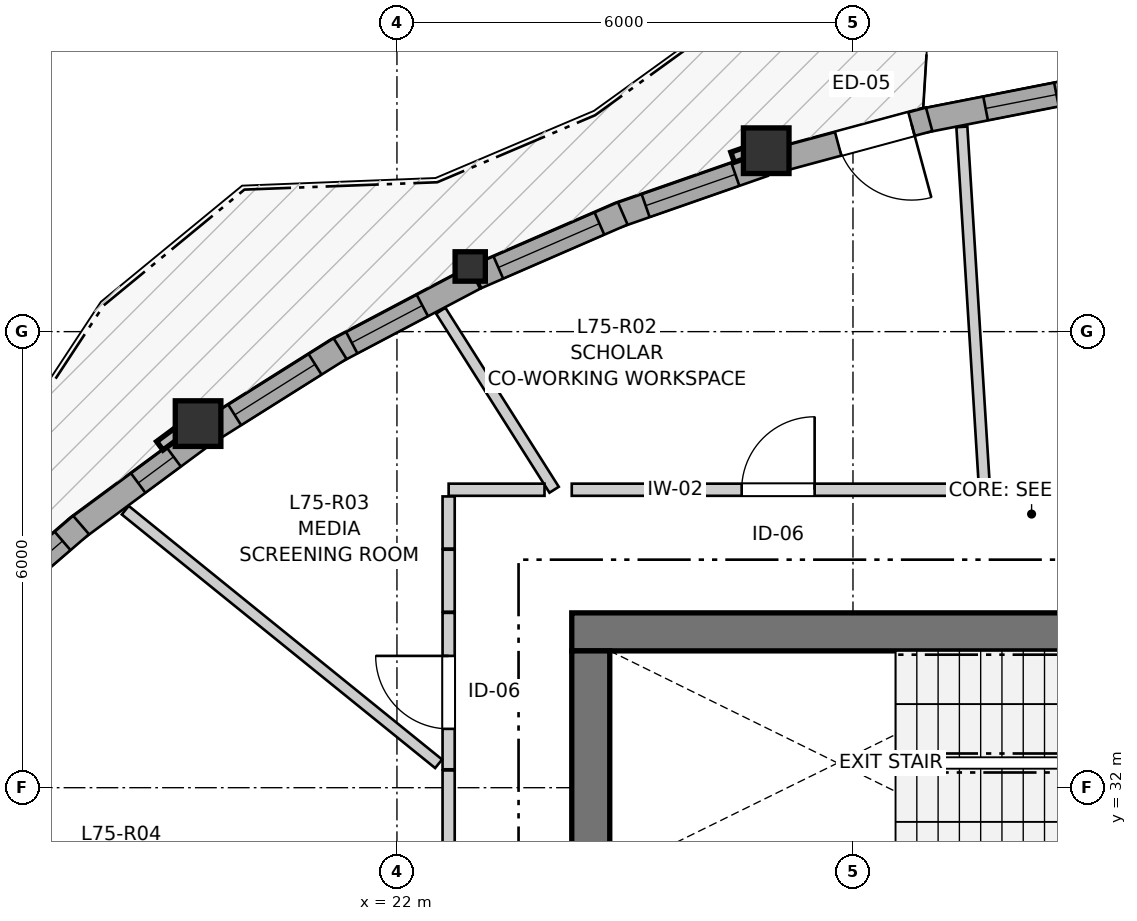
"""IFC4 building model, lengths in metres.
Left out: names, types, materials, properties, quantities, classifications, styles, units other than length and angle.
Written with IfcOpenShell. Run it as: python <this file> out.ifc"""

import sys

from ifc_helpers import new_model, si_unit, direction, frame, frame_2d, origin, origin_2d, place, context, subcontext, project, spatial, rectangle, i_section, extrude, source, transform, mapped, element, fill, save


model = new_model("IFC4")
c1 = context("Model", 3, precision=1e-05, world=origin(), true_north=direction((0.0, 1.0)))
c2 = subcontext(c1, "Body", "Model", "MODEL_VIEW")
j1 = project(units=[si_unit("LENGTHUNIT", "METRE"), si_unit("PLANEANGLEUNIT", "RADIAN")], contexts=[c1])
p1 = place(None, origin())
s1 = spatial("IfcSite", under=j1, at=p1, CompositionType="ELEMENT")
p2 = place(p1, origin())
s2 = spatial("IfcBuilding", under=s1, at=p2, CompositionType="ELEMENT")
p3 = place(p2, frame((0.0, 0.0, 250.0)))
s3 = spatial("IfcBuildingStorey", under=s2, at=p3, CompositionType="ELEMENT", Elevation=250.0)
p4 = place(p3, frame((36.4, 34.05, 0.0), z_axis=(0.0, 0.0, 1.0), x_axis=(-1.0, 0.0, 0.0)))
e1 = element("IfcWall", 1, at=p4, inside=s3, PredefinedType="SHEAR", context=c2, shape_type="SweptSolid", body=[
    extrude(rectangle(XDim=12.1, YDim=0.5, at=frame_2d((6.05, 0.0))), origin(), (0.0, 0.0, 1.0), 2.95),
])
p5 = place(p3, frame((24.55, 33.8, 0.0), z_axis=(0.0, 0.0, 1.0), x_axis=(0.0, -1.0, 0.0)))
e2 = element("IfcWall", 2, at=p5, inside=s3, PredefinedType="SHEAR", context=c2, shape_type="SweptSolid", body=[
    extrude(rectangle(XDim=15.6, YDim=0.5, at=frame_2d((7.8, 0.0))), origin(), (0.0, 0.0, 1.0), 2.95),
])
p6 = place(p5, frame((7.05, 0.0, 0.0)))
e3 = element("IfcOpeningElement", 3, at=p6, cuts=e2, PredefinedType="OPENING", context=c2, shape_type="SweptSolid", body=[
    extrude(rectangle(XDim=1.5, YDim=2.15, at=frame_2d((0.75, 1.075))), frame((0.0, 0.26, 0.0), z_axis=(0.0, -1.0, 0.0), x_axis=(1.0, 0.0, 0.0)), (0.0, 0.0, 1.0), 0.52),
])
p7 = place(p5, frame((3.52, 0.0, 0.0)))
e4 = element("IfcOpeningElement", 4, at=p7, cuts=e2, PredefinedType="OPENING", context=c2, shape_type="SweptSolid", body=[
    extrude(rectangle(XDim=0.86, YDim=2.05, at=frame_2d((0.43, 1.025))), frame((0.0, 0.26, 0.0), z_axis=(0.0, -1.0, 0.0), x_axis=(1.0, 0.0, 0.0)), (0.0, 0.0, 1.0), 0.52),
])
p8 = place(p5, frame((11.22, 0.0, 0.0)))
e5 = element("IfcOpeningElement", 5, at=p8, cuts=e2, PredefinedType="OPENING", context=c2, shape_type="SweptSolid", body=[
    extrude(rectangle(XDim=0.86, YDim=2.05, at=frame_2d((0.43, 1.025))), frame((0.0, 0.26, 0.0), z_axis=(0.0, -1.0, 0.0), x_axis=(1.0, 0.0, 0.0)), (0.0, 0.0, 1.0), 0.52),
])
m1 = source(origin(), c2, "Body", "SweptSolid", [
    extrude(rectangle(XDim=0.6, YDim=0.6, at=origin_2d()), origin(), (0.0, 0.0, 1.0), 2.95),
])
p9 = place(p3, frame((26.859, 40.38, 0.0), z_axis=(0.0, 0.0, 1.0), x_axis=(1.0, 0.0, 0.0)))
e6 = element("IfcColumn", 6, at=p9, inside=s3, PredefinedType="COLUMN", context=c2, shape_type="MappedRepresentation", body=[
    mapped(m1, transform((0.0, 0.0, 0.0), x_axis=(1.0, 0.0, 0.0), y_axis=(0.0, 1.0, 0.0), z_axis=(0.0, 0.0, 1.0), scale=1.0)),
])
m2 = source(origin(), c2, "Body", "SweptSolid", [
    extrude(i_section(OverallWidth=0.398, OverallDepth=0.387, WebThickness=0.019, FlangeThickness=0.03, FilletRadius=0.015, at=origin_2d()), origin(), (0.0, 0.0, 1.0), 2.95),
])
p10 = place(p3, frame((22.964, 38.857, 0.0), z_axis=(0.0, 0.0, 1.0), x_axis=(1.0, 0.0, 0.0)))
e7 = element("IfcColumn", 7, at=p10, inside=s3, PredefinedType="PILASTER", context=c2, shape_type="MappedRepresentation", body=[
    mapped(m2, transform((0.0, 0.0, 0.0), x_axis=(1.0, 0.0, 0.0), y_axis=(0.0, 1.0, 0.0), z_axis=(0.0, 0.0, 1.0), scale=1.0)),
])
p11 = place(p3, frame((19.383, 36.79, 0.0), z_axis=(0.0, 0.0, 1.0), x_axis=(1.0, 0.0, 0.0)))
e8 = element("IfcColumn", 8, at=p11, inside=s3, PredefinedType="COLUMN", context=c2, shape_type="MappedRepresentation", body=[
    mapped(m1, transform((0.0, 0.0, 0.0), x_axis=(1.0, 0.0, 0.0), y_axis=(0.0, 1.0, 0.0), z_axis=(0.0, 0.0, 1.0), scale=1.0)),
])
p12 = place(p3, frame((31.079, 41.198, 0.0), z_axis=(0.0, 0.0, 1.0), x_axis=(-0.981223354781, -0.192874902544, 0.0)))
e9 = element("IfcWall", 9, at=p12, inside=s3, PredefinedType="SOLIDWALL", context=c2, shape_type="SweptSolid", body=[
    extrude(rectangle(XDim=2.202, YDim=0.32, at=frame_2d((1.101, 0.0))), origin(), (0.0, 0.0, 1.0), 2.57),
])
p13 = place(p12, frame((0.409, 0.0, 0.82)))
e10 = element("IfcOpeningElement", 10, at=p13, cuts=e9, PredefinedType="OPENING", context=c2, shape_type="SweptSolid", body=[
    extrude(rectangle(XDim=0.95, YDim=1.35, at=frame_2d((0.475, 0.675))), frame((0.0, 0.17, 0.0), z_axis=(0.0, -1.0, 0.0), x_axis=(1.0, 0.0, 0.0)), (0.0, 0.0, 1.0), 0.34),
])
p14 = place(p3, frame((29.002, 40.793, 0.0), z_axis=(0.0, 0.0, 1.0), x_axis=(-0.965467637734, -0.260523013357, 0.0)))
e11 = element("IfcWall", 11, at=p14, inside=s3, PredefinedType="SOLIDWALL", context=c2, shape_type="SweptSolid", body=[
    extrude(rectangle(XDim=2.087, YDim=0.32, at=frame_2d((1.043, 0.0))), origin(), (0.0, 0.0, 1.0), 2.57),
])
p15 = place(p14, frame((0.24, 0.0, 0.0)))
e12 = element("IfcOpeningElement", 12, at=p15, cuts=e11, PredefinedType="OPENING", context=c2, shape_type="SweptSolid", body=[
    extrude(rectangle(XDim=1.0, YDim=2.1, at=frame_2d((0.5, 1.05))), frame((0.0, 0.17, 0.0), z_axis=(0.0, -1.0, 0.0), x_axis=(1.0, 0.0, 0.0)), (0.0, 0.0, 1.0), 0.34),
])
p16 = place(p3, frame((26.826, 40.199, 0.0), z_axis=(0.0, 0.0, 1.0), x_axis=(-0.944152853185, -0.329507799335, 0.0)))
e13 = element("IfcWall", 13, at=p16, inside=s3, PredefinedType="SOLIDWALL", context=c2, shape_type="SweptSolid", body=[
    extrude(rectangle(XDim=2.052, YDim=0.32, at=frame_2d((1.026, 0.0))), origin(), (0.0, 0.0, 1.0), 2.57),
])
p17 = place(p16, frame((0.396, 0.0, 0.82)))
e14 = element("IfcOpeningElement", 14, at=p17, cuts=e13, PredefinedType="OPENING", context=c2, shape_type="SweptSolid", body=[
    extrude(rectangle(XDim=1.25, YDim=1.35, at=frame_2d((0.625, 0.675))), frame((0.0, 0.17, 0.0), z_axis=(0.0, -1.0, 0.0), x_axis=(1.0, 0.0, 0.0)), (0.0, 0.0, 1.0), 0.34),
])
p18 = place(p3, frame((24.97, 39.555, 0.0), z_axis=(0.0, 0.0, 1.0), x_axis=(-0.917086701486, -0.398687825193, 0.0)))
e15 = element("IfcWall", 15, at=p18, inside=s3, PredefinedType="SOLIDWALL", context=c2, shape_type="SweptSolid", body=[
    extrude(rectangle(XDim=2.099, YDim=0.32, at=frame_2d((1.049, 0.0))), origin(), (0.0, 0.0, 1.0), 2.57),
])
p19 = place(p18, frame((0.334, 0.0, 0.82)))
e16 = element("IfcOpeningElement", 16, at=p19, cuts=e15, PredefinedType="OPENING", context=c2, shape_type="SweptSolid", body=[
    extrude(rectangle(XDim=1.45, YDim=1.25, at=frame_2d((0.725, 0.625))), frame((0.0, 0.17, 0.0), z_axis=(0.0, -1.0, 0.0), x_axis=(1.0, 0.0, 0.0)), (0.0, 0.0, 1.0), 0.34),
])
p20 = place(p3, frame((23.021, 38.707, 0.0), z_axis=(0.0, 0.0, 1.0), x_axis=(-0.884384752847, -0.466758619558, 0.0)))
e17 = element("IfcWall", 17, at=p20, inside=s3, PredefinedType="SOLIDWALL", context=c2, shape_type="SweptSolid", body=[
    extrude(rectangle(XDim=2.087, YDim=0.32, at=frame_2d((1.043, 0.0))), origin(), (0.0, 0.0, 1.0), 2.57),
])
p21 = place(p20, frame((0.777, 0.0, 0.82)))
e18 = element("IfcOpeningElement", 18, at=p21, cuts=e17, PredefinedType="OPENING", context=c2, shape_type="SweptSolid", body=[
    extrude(rectangle(XDim=1.05, YDim=1.45, at=frame_2d((0.525, 0.725))), frame((0.0, 0.17, 0.0), z_axis=(0.0, -1.0, 0.0), x_axis=(1.0, 0.0, 0.0)), (0.0, 0.0, 1.0), 0.34),
])
p22 = place(p3, frame((21.252, 37.777, 0.0), z_axis=(0.0, 0.0, 1.0), x_axis=(-0.846382416581, -0.532575633034, 0.0)))
e19 = element("IfcWall", 19, at=p22, inside=s3, PredefinedType="SOLIDWALL", context=c2, shape_type="SweptSolid", body=[
    extrude(rectangle(XDim=2.017, YDim=0.32, at=frame_2d((1.008, 0.0))), origin(), (0.0, 0.0, 1.0), 2.57),
])
p23 = place(p22, frame((0.388, 0.0, 0.82)))
e20 = element("IfcOpeningElement", 20, at=p23, cuts=e19, PredefinedType="OPENING", context=c2, shape_type="SweptSolid", body=[
    extrude(rectangle(XDim=1.25, YDim=1.35, at=frame_2d((0.625, 0.675))), frame((0.0, 0.17, 0.0), z_axis=(0.0, -1.0, 0.0), x_axis=(1.0, 0.0, 0.0)), (0.0, 0.0, 1.0), 0.34),
])
p24 = place(p3, frame((19.406, 36.608, 0.0), z_axis=(0.0, 0.0, 1.0), x_axis=(-0.803853407146, -0.594827453821, 0.0)))
e21 = element("IfcWall", 21, at=p24, inside=s3, PredefinedType="SOLIDWALL", context=c2, shape_type="SweptSolid", body=[
    extrude(rectangle(XDim=2.029, YDim=0.32, at=frame_2d((1.014, 0.0))), origin(), (0.0, 0.0, 1.0), 2.57),
])
p25 = place(p24, frame((0.428, 0.0, 0.82)))
e22 = element("IfcOpeningElement", 22, at=p25, cuts=e21, PredefinedType="OPENING", context=c2, shape_type="SweptSolid", body=[
    extrude(rectangle(XDim=0.58, YDim=1.35, at=frame_2d((0.29, 0.675))), frame((0.0, 0.17, 0.0), z_axis=(0.0, -1.0, 0.0), x_axis=(1.0, 0.0, 0.0)), (0.0, 0.0, 1.0), 0.34),
])
p26 = place(p3, frame((17.844, 35.456, 0.0), z_axis=(0.0, 0.0, 1.0), x_axis=(-0.757409961601, -0.652939622069, 0.0)))
e23 = element("IfcWall", 23, at=p26, inside=s3, PredefinedType="SOLIDWALL", context=c2, shape_type="SweptSolid", body=[
    extrude(rectangle(XDim=2.122, YDim=0.32, at=frame_2d((1.061, 0.0))), origin(), (0.0, 0.0, 1.0), 2.57),
])
p27 = place(p26, frame((0.321, 0.0, 0.82)))
e24 = element("IfcOpeningElement", 24, at=p27, cuts=e23, PredefinedType="OPENING", context=c2, shape_type="SweptSolid", body=[
    extrude(rectangle(XDim=1.5, YDim=1.45, at=frame_2d((0.75, 0.725))), frame((0.0, 0.17, 0.0), z_axis=(0.0, -1.0, 0.0), x_axis=(1.0, 0.0, 0.0)), (0.0, 0.0, 1.0), 0.34),
])
p28 = place(p3, frame((24.3, 35.92, 0.0), z_axis=(0.0, 0.0, 1.0), x_axis=(1.0, 0.0, 0.0)))
e25 = element("IfcWall", 25, at=p28, inside=s3, PredefinedType="PARTITIONING", context=c2, shape_type="SweptSolid", body=[
    extrude(rectangle(XDim=5.446, YDim=0.16, at=frame_2d((2.723, 0.0))), origin(), (0.0, 0.0, 1.0), 2.95),
])
p29 = place(p28, frame((2.236, 0.0, 0.0)))
e26 = element("IfcOpeningElement", 26, at=p29, cuts=e25, PredefinedType="OPENING", context=c2, shape_type="SweptSolid", body=[
    extrude(rectangle(XDim=0.96, YDim=2.1, at=frame_2d((0.48, 1.05))), frame((0.0, 0.09, 0.0), z_axis=(0.0, -1.0, 0.0), x_axis=(1.0, 0.0, 0.0)), (0.0, 0.0, 1.0), 0.18),
])
p30 = place(p3, frame((22.68, 27.85, 0.0), z_axis=(0.0, 0.0, 1.0), x_axis=(0.0, 1.0, 0.0)))
e27 = element("IfcWall", 27, at=p30, inside=s3, PredefinedType="PARTITIONING", context=c2, shape_type="SweptSolid", body=[
    extrude(rectangle(XDim=4.377, YDim=0.16, at=frame_2d((2.188, 0.0))), origin(), (0.0, 0.0, 1.0), 2.218),
])
p31 = place(p30, frame((1.559, 0.0, 0.0)))
e28 = element("IfcOpeningElement", 28, at=p31, cuts=e27, PredefinedType="OPENING", context=c2, shape_type="SweptSolid", body=[
    extrude(rectangle(XDim=1.3, YDim=2.1, at=frame_2d((0.65, 1.05))), frame((0.0, 0.09, 0.0), z_axis=(0.0, -1.0, 0.0), x_axis=(1.0, 0.0, 0.0)), (0.0, 0.0, 1.0), 0.18),
])
p32 = place(p3, frame((29.761, 35.92, 0.0), z_axis=(0.0, 0.0, 1.0), x_axis=(1.0, 0.0, 0.0)))
e29 = element("IfcWall", 29, at=p32, inside=s3, PredefinedType="PARTITIONING", context=c2, shape_type="SweptSolid", body=[
    extrude(rectangle(XDim=3.61, YDim=0.16, at=frame_2d((1.805, 0.0))), origin(), (0.0, 0.0, 1.0), 2.95),
])
p33 = place(p32, frame((1.133, 0.0, 0.0)))
e30 = element("IfcOpeningElement", 30, at=p33, cuts=e29, PredefinedType="OPENING", context=c2, shape_type="SweptSolid", body=[
    extrude(rectangle(XDim=1.3, YDim=2.1, at=frame_2d((0.65, 1.05))), frame((0.0, 0.09, 0.0), z_axis=(0.0, -1.0, 0.0), x_axis=(1.0, 0.0, 0.0)), (0.0, 0.0, 1.0), 0.18),
])
p34 = place(p3, frame((22.68, 32.242, 0.0), z_axis=(0.0, 0.0, 1.0), x_axis=(0.0, 1.0, 0.0)))
e31 = element("IfcWall", 31, at=p34, inside=s3, PredefinedType="PARTITIONING", context=c2, shape_type="SweptSolid", body=[
    extrude(rectangle(XDim=2.058, YDim=0.16, at=frame_2d((1.029, 0.0))), origin(), (0.0, 0.0, 1.0), 2.618),
])
p35 = place(p34, frame((0.532, 0.0, 0.0)))
e32 = element("IfcOpeningElement", 32, at=p35, cuts=e31, PredefinedType="OPENING", context=c2, shape_type="SweptSolid", body=[
    extrude(rectangle(XDim=0.96, YDim=2.1, at=frame_2d((0.48, 1.05))), frame((0.0, 0.09, 0.0), z_axis=(0.0, -1.0, 0.0), x_axis=(1.0, 0.0, 0.0)), (0.0, 0.0, 1.0), 0.18),
])
p36 = place(p3, frame((18.426, 35.651, 0.0), z_axis=(0.0, 0.0, 1.0), x_axis=(0.777348848989, -0.629069763202, 0.0)))
e33 = element("IfcWall", 33, at=p36, inside=s3, PredefinedType="PARTITIONING", context=c2, shape_type="SweptSolid", body=[
    extrude(rectangle(XDim=5.303, YDim=0.145, at=frame_2d((2.652, 0.0))), origin(), (0.0, 0.0, 1.0), 2.95),
])
p37 = place(p3, frame((29.433, 40.694, 0.0), z_axis=(0.0, 0.0, 1.0), x_axis=(0.062358842424, -0.998053793526, 0.0)))
e34 = element("IfcWall", 34, at=p37, inside=s3, PredefinedType="PARTITIONING", context=c2, shape_type="SweptSolid", body=[
    extrude(rectangle(XDim=4.69, YDim=0.145, at=frame_2d((2.345, 0.0))), origin(), (0.0, 0.0, 1.0), 2.95),
])
p38 = place(p3, frame((22.576, 38.275, 0.0), z_axis=(0.0, 0.0, 1.0), x_axis=(0.535027081988, -0.84483490786, 0.0)))
e35 = element("IfcWall", 35, at=p38, inside=s3, PredefinedType="PARTITIONING", context=c2, shape_type="SweptSolid", body=[
    extrude(rectangle(XDim=2.788, YDim=0.145, at=frame_2d((1.394, 0.0))), origin(), (0.0, 0.0, 1.0), 2.95),
])
p39 = place(p3, frame((22.68, 35.92, 0.0), z_axis=(0.0, 0.0, 1.0), x_axis=(1.0, 0.0, 0.0)))
e36 = element("IfcWall", 36, at=p39, inside=s3, PredefinedType="PARTITIONING", context=c2, shape_type="SweptSolid", body=[
    extrude(rectangle(XDim=1.261, YDim=0.16, at=frame_2d((0.631, 0.0))), origin(), (0.0, 0.0, 1.0), 2.95),
])
p40 = place(p3, frame((22.68, 34.315, 0.0), z_axis=(0.0, 0.0, 1.0), x_axis=(0.0, 1.0, 0.0)))
e37 = element("IfcWall", 37, at=p40, inside=s3, PredefinedType="PARTITIONING", context=c2, shape_type="SweptSolid", body=[
    extrude(rectangle(XDim=0.816, YDim=0.16, at=frame_2d((0.408, 0.0))), origin(), (0.0, 0.0, 1.0), 2.95),
])
p41 = place(p3, frame((22.68, 35.146, 0.0), z_axis=(0.0, 0.0, 1.0), x_axis=(0.0, 1.0, 0.0)))
e38 = element("IfcWall", 38, at=p41, inside=s3, PredefinedType="PARTITIONING", context=c2, shape_type="SweptSolid", body=[
    extrude(rectangle(XDim=0.686, YDim=0.16, at=frame_2d((0.343, 0.0))), origin(), (0.0, 0.0, 1.0), 2.95),
])
m3 = source(origin(), c2, "Body", "SweptSolid", [
    extrude(rectangle(XDim=0.95, YDim=1.35, at=frame_2d((0.475, 0.675))), frame((0.0, 0.03, 0.0), z_axis=(0.0, -1.0, 0.0), x_axis=(1.0, 0.0, 0.0)), (0.0, 0.0, 1.0), 0.06),
])
p42 = place(p13, origin())
e39 = element("IfcWindow", 39, at=p42, inside=s3, PartitioningType="SINGLE_PANEL", PredefinedType="WINDOW", context=c2, shape_type="MappedRepresentation", body=[
    mapped(m3, transform((0.0, 0.0, 0.0), x_axis=(1.0, 0.0, 0.0), y_axis=(0.0, 1.0, 0.0), z_axis=(0.0, 0.0, 1.0), scale=1.0)),
])
fill(e10, e39)
m4 = source(origin(), c2, "Body", "SweptSolid", [
    extrude(rectangle(XDim=1.25, YDim=1.35, at=frame_2d((0.625, 0.675))), frame((0.0, 0.03, 0.0), z_axis=(0.0, -1.0, 0.0), x_axis=(1.0, 0.0, 0.0)), (0.0, 0.0, 1.0), 0.06),
])
p43 = place(p17, origin())
e40 = element("IfcWindow", 40, at=p43, inside=s3, PartitioningType="SINGLE_PANEL", PredefinedType="WINDOW", context=c2, shape_type="MappedRepresentation", body=[
    mapped(m4, transform((0.0, 0.0, 0.0), x_axis=(1.0, 0.0, 0.0), y_axis=(0.0, 1.0, 0.0), z_axis=(0.0, 0.0, 1.0), scale=1.0)),
])
fill(e14, e40)
m5 = source(origin(), c2, "Body", "SweptSolid", [
    extrude(rectangle(XDim=1.45, YDim=1.25, at=frame_2d((0.725, 0.625))), frame((0.0, 0.03, 0.0), z_axis=(0.0, -1.0, 0.0), x_axis=(1.0, 0.0, 0.0)), (0.0, 0.0, 1.0), 0.06),
])
p44 = place(p19, origin())
e41 = element("IfcWindow", 41, at=p44, inside=s3, PartitioningType="SINGLE_PANEL", PredefinedType="WINDOW", context=c2, shape_type="MappedRepresentation", body=[
    mapped(m5, transform((0.0, 0.0, 0.0), x_axis=(1.0, 0.0, 0.0), y_axis=(0.0, 1.0, 0.0), z_axis=(0.0, 0.0, 1.0), scale=1.0)),
])
fill(e16, e41)
m6 = source(origin(), c2, "Body", "SweptSolid", [
    extrude(rectangle(XDim=1.05, YDim=1.45, at=frame_2d((0.525, 0.725))), frame((0.0, 0.03, 0.0), z_axis=(0.0, -1.0, 0.0), x_axis=(1.0, 0.0, 0.0)), (0.0, 0.0, 1.0), 0.06),
])
p45 = place(p21, origin())
e42 = element("IfcWindow", 42, at=p45, inside=s3, PartitioningType="SINGLE_PANEL", PredefinedType="WINDOW", context=c2, shape_type="MappedRepresentation", body=[
    mapped(m6, transform((0.0, 0.0, 0.0), x_axis=(1.0, 0.0, 0.0), y_axis=(0.0, 1.0, 0.0), z_axis=(0.0, 0.0, 1.0), scale=1.0)),
])
fill(e18, e42)
p46 = place(p23, origin())
e43 = element("IfcWindow", 43, at=p46, inside=s3, PartitioningType="SINGLE_PANEL", PredefinedType="WINDOW", context=c2, shape_type="MappedRepresentation", body=[
    mapped(m4, transform((0.0, 0.0, 0.0), x_axis=(1.0, 0.0, 0.0), y_axis=(0.0, 1.0, 0.0), z_axis=(0.0, 0.0, 1.0), scale=1.0)),
])
fill(e20, e43)
m7 = source(origin(), c2, "Body", "SweptSolid", [
    extrude(rectangle(XDim=0.58, YDim=1.35, at=frame_2d((0.29, 0.675))), frame((0.0, 0.03, 0.0), z_axis=(0.0, -1.0, 0.0), x_axis=(1.0, 0.0, 0.0)), (0.0, 0.0, 1.0), 0.06),
])
p47 = place(p25, origin())
e44 = element("IfcWindow", 44, at=p47, inside=s3, PartitioningType="SINGLE_PANEL", PredefinedType="WINDOW", context=c2, shape_type="MappedRepresentation", body=[
    mapped(m7, transform((0.0, 0.0, 0.0), x_axis=(1.0, 0.0, 0.0), y_axis=(0.0, 1.0, 0.0), z_axis=(0.0, 0.0, 1.0), scale=1.0)),
])
fill(e22, e44)
m8 = source(origin(), c2, "Body", "SweptSolid", [
    extrude(rectangle(XDim=1.5, YDim=1.45, at=frame_2d((0.75, 0.725))), frame((0.0, 0.03, 0.0), z_axis=(0.0, -1.0, 0.0), x_axis=(1.0, 0.0, 0.0)), (0.0, 0.0, 1.0), 0.06),
])
p48 = place(p27, origin())
e45 = element("IfcWindow", 45, at=p48, inside=s3, PartitioningType="SINGLE_PANEL", PredefinedType="WINDOW", context=c2, shape_type="MappedRepresentation", body=[
    mapped(m8, transform((0.0, 0.0, 0.0), x_axis=(1.0, 0.0, 0.0), y_axis=(0.0, 1.0, 0.0), z_axis=(0.0, 0.0, 1.0), scale=1.0)),
])
fill(e24, e45)
m9 = source(origin(), c2, "Body", "SweptSolid", [
    extrude(rectangle(XDim=1.0, YDim=2.1, at=frame_2d((0.5, 1.05))), frame((0.0, 0.025, 0.0), z_axis=(0.0, -1.0, 0.0), x_axis=(1.0, 0.0, 0.0)), (0.0, 0.0, 1.0), 0.05),
])
p49 = place(p15, origin())
e46 = element("IfcDoor", 46, at=p49, inside=s3, OperationType="SINGLE_SWING_LEFT", PredefinedType="DOOR", context=c2, shape_type="MappedRepresentation", body=[
    mapped(m9, transform((0.0, 0.0, 0.0), x_axis=(1.0, 0.0, 0.0), y_axis=(0.0, 1.0, 0.0), z_axis=(0.0, 0.0, 1.0), scale=1.0)),
])
fill(e12, e46)
m10 = source(origin(), c2, "Body", "SweptSolid", [
    extrude(rectangle(XDim=0.96, YDim=2.1, at=frame_2d((0.48, 1.05))), frame((0.0, 0.025, 0.0), z_axis=(0.0, -1.0, 0.0), x_axis=(1.0, 0.0, 0.0)), (0.0, 0.0, 1.0), 0.05),
])
p50 = place(p29, origin())
e47 = element("IfcDoor", 47, at=p50, inside=s3, OperationType="SINGLE_SWING_RIGHT", PredefinedType="DOOR", context=c2, shape_type="MappedRepresentation", body=[
    mapped(m10, transform((0.0, 0.0, 0.0), x_axis=(1.0, 0.0, 0.0), y_axis=(0.0, 1.0, 0.0), z_axis=(0.0, 0.0, 1.0), scale=1.0)),
])
fill(e26, e47)
p51 = place(p35, origin())
e48 = element("IfcDoor", 48, at=p51, inside=s3, OperationType="SINGLE_SWING_RIGHT", PredefinedType="DOOR", context=c2, shape_type="MappedRepresentation", body=[
    mapped(m10, transform((0.0, 0.0, 0.0), x_axis=(1.0, 0.0, 0.0), y_axis=(0.0, 1.0, 0.0), z_axis=(0.0, 0.0, 1.0), scale=1.0)),
])
fill(e32, e48)
save(model, sys.argv[1])
